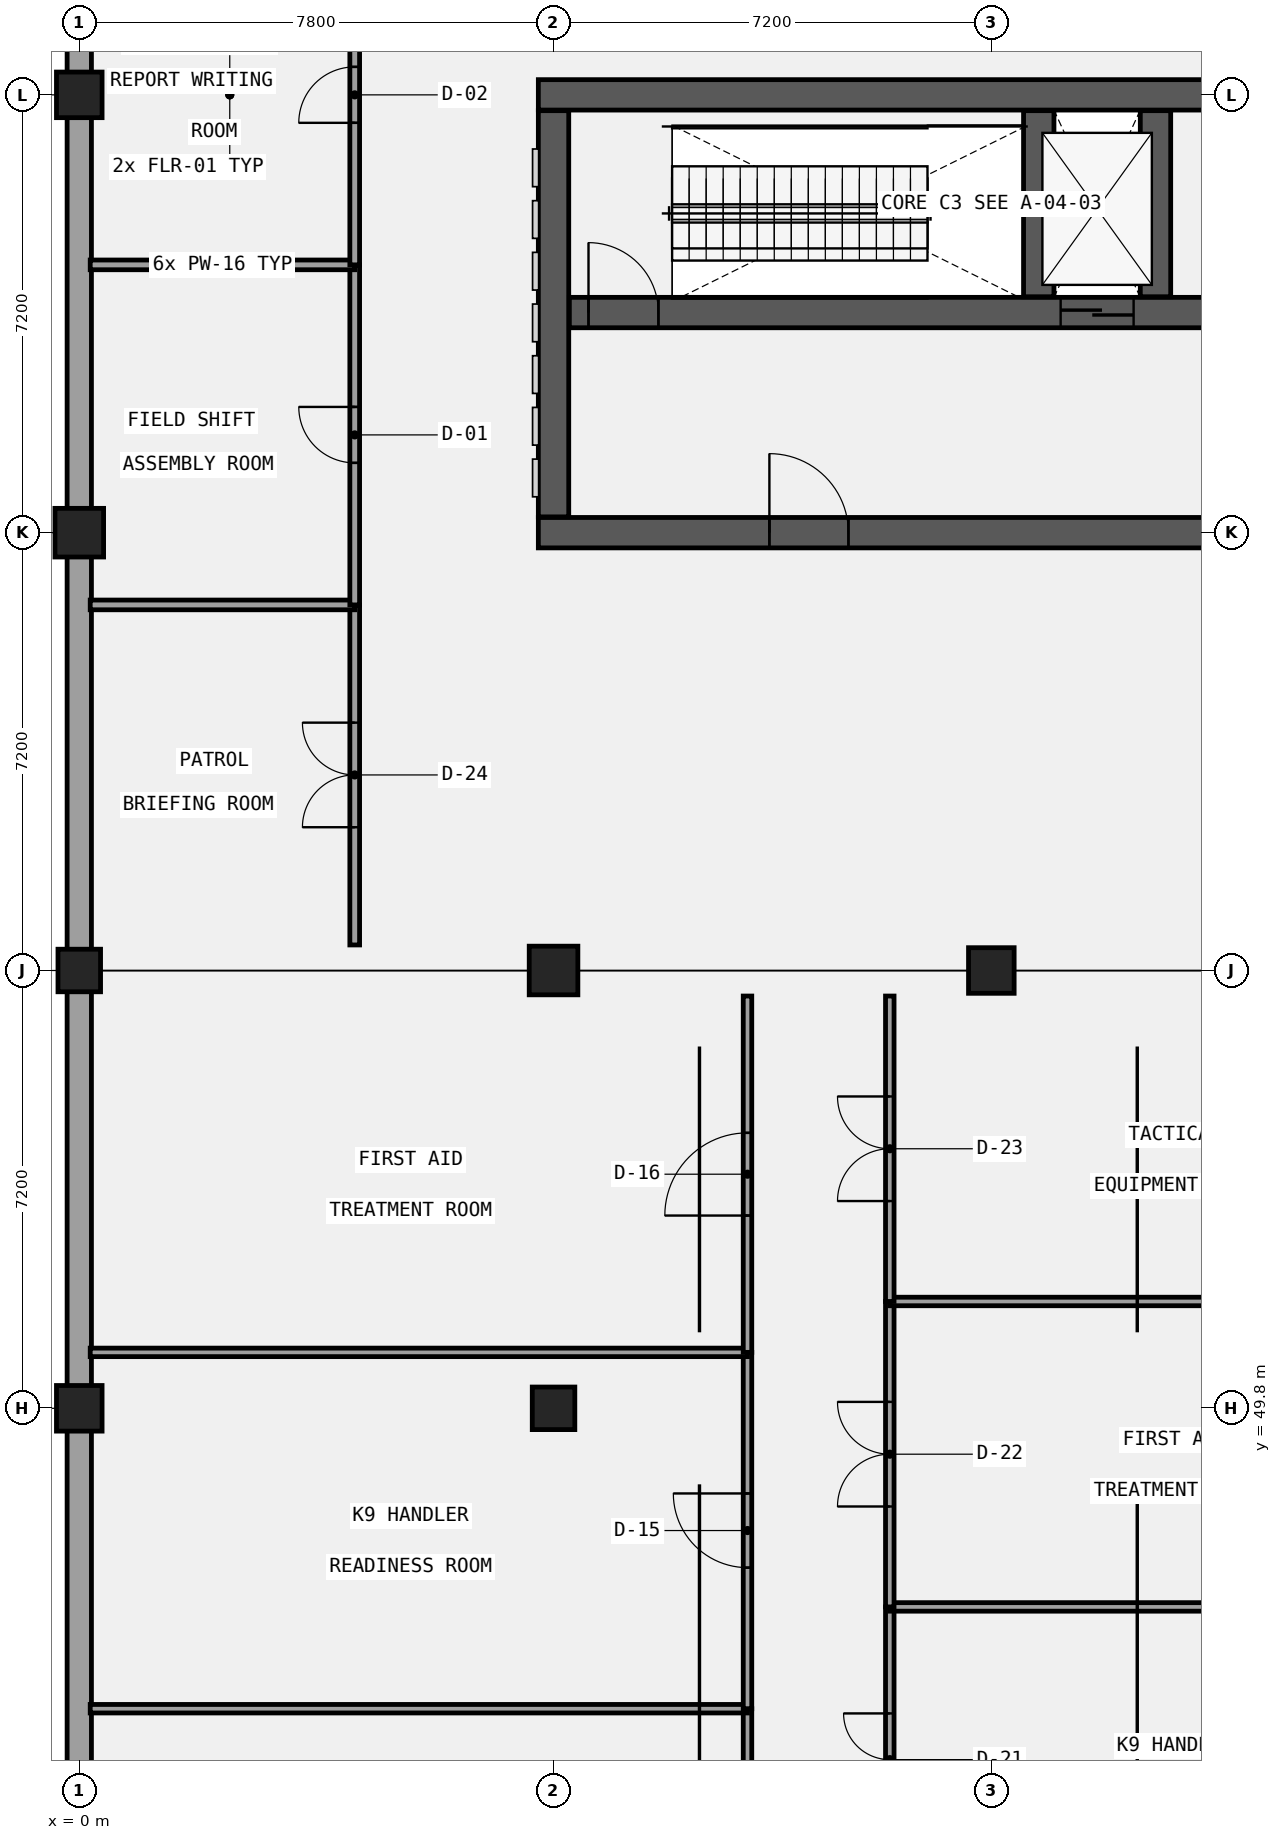
"""IFC4 building model, lengths in metres.
Left out: names, types, materials, properties, quantities, classifications, styles, units other than length and angle.
Written with IfcOpenShell. Run it as: python <this file> out.ifc"""

import sys

from ifc_helpers import new_model, si_unit, direction, frame, frame_2d, origin, origin_2d, place, context, subcontext, project, spatial, rectangle, extrude, element, fill, save


model = new_model("IFC4")
c1 = context("Model", 3, precision=1e-05, world=origin(), true_north=direction((0.0, 1.0)))
c2 = subcontext(c1, "Body", "Model", "MODEL_VIEW")
j1 = project(units=[si_unit("LENGTHUNIT", "METRE"), si_unit("PLANEANGLEUNIT", "RADIAN")], contexts=[c1])
p1 = place(None, origin())
s1 = spatial("IfcSite", under=j1, at=p1, CompositionType="ELEMENT")
p2 = place(p1, origin())
s2 = spatial("IfcBuilding", under=s1, at=p2, CompositionType="ELEMENT")
p3 = place(p2, origin())
s3 = spatial("IfcBuildingStorey", under=s2, at=p3, CompositionType="ELEMENT", Elevation=0.0)
p4 = place(p3, frame((7.55, 71.4, 0.0), z_axis=(0.0, 0.0, 1.0), x_axis=(1.0, 0.0, 0.0)))
e1 = element("IfcWall", 1, at=p4, inside=s3, PredefinedType="SHEAR", context=c2, shape_type="SweptSolid", body=[
    extrude(rectangle(XDim=14.9, YDim=0.5, at=frame_2d((7.45, 0.0))), origin(), (0.0, 0.0, 1.0), 5.4),
])
p5 = place(p3, frame((7.55, 64.2, 0.0), z_axis=(0.0, 0.0, 1.0), x_axis=(1.0, 0.0, 0.0)))
e2 = element("IfcWall", 2, at=p5, inside=s3, PredefinedType="SHEAR", context=c2, shape_type="SweptSolid", body=[
    extrude(rectangle(XDim=14.9, YDim=0.5, at=frame_2d((7.45, 0.0))), origin(), (0.0, 0.0, 1.0), 5.4),
])
p6 = place(p5, frame((3.8, 0.0, 0.0)))
e3 = element("IfcOpeningElement", 3, at=p6, cuts=e2, PredefinedType="OPENING", context=c2, shape_type="SweptSolid", body=[
    extrude(rectangle(XDim=1.3, YDim=2.2, at=frame_2d((0.65, 1.1))), frame((0.0, 0.26, 0.0), z_axis=(0.0, -1.0, 0.0), x_axis=(1.0, 0.0, 0.0)), (0.0, 0.0, 1.0), 0.52),
])
p7 = place(p3, frame((7.8, 64.46, 0.0), z_axis=(0.0, 0.0, 1.0), x_axis=(0.0, 1.0, 0.0)))
e4 = element("IfcWall", 4, at=p7, inside=s3, PredefinedType="SHEAR", context=c2, shape_type="SweptSolid", body=[
    extrude(rectangle(XDim=6.68, YDim=0.5, at=frame_2d((3.34, 0.0))), origin(), (0.0, 0.0, 1.0), 5.4),
])
p8 = place(p3, frame((8.06, 67.82, 0.0), z_axis=(0.0, 0.0, 1.0), x_axis=(1.0, 0.0, 0.0)))
e5 = element("IfcWall", 5, at=p8, inside=s3, PredefinedType="SHEAR", context=c2, shape_type="SweptSolid", body=[
    extrude(rectangle(XDim=13.88, YDim=0.5, at=frame_2d((6.94, 0.0))), origin(), (0.0, 0.0, 1.0), 5.4),
])
p9 = place(p8, frame((8.08, 0.0, 0.0)))
e6 = element("IfcOpeningElement", 6, at=p9, cuts=e5, PredefinedType="OPENING", context=c2, shape_type="SweptSolid", body=[
    extrude(rectangle(XDim=1.2, YDim=2.15, at=frame_2d((0.6, 1.075))), frame((0.0, 0.26, 0.0), z_axis=(0.0, -1.0, 0.0), x_axis=(1.0, 0.0, 0.0)), (0.0, 0.0, 1.0), 0.52),
])
p10 = place(p8, frame((0.315, 0.0, 0.0)))
e7 = element("IfcOpeningElement", 7, at=p10, cuts=e5, PredefinedType="OPENING", context=c2, shape_type="SweptSolid", body=[
    extrude(rectangle(XDim=1.15, YDim=2.15, at=frame_2d((0.575, 1.075))), frame((0.0, 0.26, 0.0), z_axis=(0.0, -1.0, 0.0), x_axis=(1.0, 0.0, 0.0)), (0.0, 0.0, 1.0), 0.52),
])
for number, where, z_axis, x_axis in (
    (8, (15.78, 68.08, 0.0), (0.0, 0.0, 1.0), (0.0, 1.0, 0.0)),
    (9, (17.7, 68.08, 0.0), (0.0, 0.0, 1.0), (0.0, 1.0, 0.0)),
):
    element("IfcWall", number, at=place(p3, frame(where, z_axis=z_axis, x_axis=x_axis)), inside=s3, PredefinedType="SHEAR", context=c2, shape_type="SweptSolid", body=[
        extrude(rectangle(XDim=3.06, YDim=0.5, at=frame_2d((1.53, 0.0))), origin(), (0.0, 0.0, 1.0), 5.4),
    ])
p11 = place(p3, frame((0.0, 49.8, -0.32), z_axis=(0.0, 0.0, 1.0), x_axis=(1.0, 0.0, 0.0)))
e10 = element("IfcColumn", 10, at=p11, inside=s3, PredefinedType="COLUMN", context=c2, shape_type="SweptSolid", body=[
    extrude(rectangle(XDim=0.75, YDim=0.75, at=origin_2d()), origin(), (0.0, 0.0, 1.0), 5.72),
])
p12 = place(p3, frame((0.0, 57.0, -0.32), z_axis=(0.0, 0.0, 1.0), x_axis=(1.0, 0.0, 0.0)))
e11 = element("IfcColumn", 11, at=p12, inside=s3, PredefinedType="COLUMN", context=c2, shape_type="SweptSolid", body=[
    extrude(rectangle(XDim=0.7, YDim=0.7, at=origin_2d()), origin(), (0.0, 0.0, 1.0), 5.72),
])
p13 = place(p3, frame((0.0, 64.2, -0.32), z_axis=(0.0, 0.0, 1.0), x_axis=(1.0, 0.0, 0.0)))
e12 = element("IfcColumn", 12, at=p13, inside=s3, PredefinedType="COLUMN", context=c2, shape_type="SweptSolid", body=[
    extrude(rectangle(XDim=0.8, YDim=0.8, at=origin_2d()), origin(), (0.0, 0.0, 1.0), 5.72),
])
p14 = place(p3, frame((0.0, 71.4, -0.32), z_axis=(0.0, 0.0, 1.0), x_axis=(1.0, 0.0, 0.0)))
e13 = element("IfcColumn", 13, at=p14, inside=s3, PredefinedType="COLUMN", context=c2, shape_type="SweptSolid", body=[
    extrude(rectangle(XDim=0.75, YDim=0.75, at=origin_2d()), origin(), (0.0, 0.0, 1.0), 5.72),
])
p15 = place(p3, frame((7.8, 49.8, 0.0), z_axis=(0.0, 0.0, 1.0), x_axis=(1.0, 0.0, 0.0)))
e14 = element("IfcColumn", 14, at=p15, inside=s3, PredefinedType="COLUMN", context=c2, shape_type="SweptSolid", body=[
    extrude(rectangle(XDim=0.7, YDim=0.7, at=origin_2d()), origin(), (0.0, 0.0, 1.0), 5.4),
])
p16 = place(p3, frame((7.8, 57.0, 0.0), z_axis=(0.0, 0.0, 1.0), x_axis=(1.0, 0.0, 0.0)))
e15 = element("IfcColumn", 15, at=p16, inside=s3, PredefinedType="COLUMN", context=c2, shape_type="SweptSolid", body=[
    extrude(rectangle(XDim=0.8, YDim=0.8, at=origin_2d()), origin(), (0.0, 0.0, 1.0), 5.4),
])
p17 = place(p3, frame((15.0, 57.0, 0.0), z_axis=(0.0, 0.0, 1.0), x_axis=(1.0, 0.0, 0.0)))
e16 = element("IfcColumn", 16, at=p17, inside=s3, PredefinedType="COLUMN", context=c2, shape_type="SweptSolid", body=[
    extrude(rectangle(XDim=0.75, YDim=0.75, at=origin_2d()), origin(), (0.0, 0.0, 1.0), 5.4),
])
p18 = place(p3, frame((0.0, 85.6, 0.0), z_axis=(0.0, 0.0, 1.0), x_axis=(0.0, -1.0, 0.0)))
e17 = element("IfcWall", 17, at=p18, inside=s3, PredefinedType="SOLIDWALL", context=c2, shape_type="SweptSolid", body=[
    extrude(rectangle(XDim=28.4, YDim=0.4, at=frame_2d((14.2, 0.0))), origin(), (0.0, 0.0, 1.0), 4.37),
])
p19 = place(p3, frame((0.0, 56.8, 0.0), z_axis=(0.0, 0.0, 1.0), x_axis=(0.0, -1.0, 0.0)))
e18 = element("IfcWall", 18, at=p19, inside=s3, PredefinedType="SOLIDWALL", context=c2, shape_type="SweptSolid", body=[
    extrude(rectangle(XDim=35.6, YDim=0.4, at=frame_2d((17.8, 0.0))), origin(), (0.0, 0.0, 1.0), 4.37),
])
p20 = place(p3, frame((10.99, 39.0, 0.0), z_axis=(0.0, 0.0, 1.0), x_axis=(0.0, 1.0, 0.0)))
e19 = element("IfcWall", 19, at=p20, inside=s3, PredefinedType="PARTITIONING", context=c2, shape_type="SweptSolid", body=[
    extrude(rectangle(XDim=5.86, YDim=0.14, at=frame_2d((2.93, 0.0))), origin(), (0.0, 0.0, 1.0), 5.12),
])
p21 = place(p20, frame((2.32, 0.0, 0.0)))
e20 = element("IfcOpeningElement", 20, at=p21, cuts=e19, PredefinedType="OPENING", context=c2, shape_type="SweptSolid", body=[
    extrude(rectangle(XDim=1.22, YDim=2.22, at=frame_2d((0.61, 1.11))), frame((0.0, 0.08, 0.0), z_axis=(0.0, -1.0, 0.0), x_axis=(1.0, 0.0, 0.0)), (0.0, 0.0, 1.0), 0.16),
])
p22 = place(p3, frame((0.18, 44.86, 0.0), z_axis=(0.0, 0.0, 1.0), x_axis=(1.0, 0.0, 0.0)))
e21 = element("IfcWall", 21, at=p22, inside=s3, PredefinedType="PARTITIONING", context=c2, shape_type="SweptSolid", body=[
    extrude(rectangle(XDim=10.81, YDim=0.14, at=frame_2d((5.405, 0.0))), origin(), (0.0, 0.0, 1.0), 5.12),
])
p23 = place(p3, frame((10.99, 44.86, 0.0), z_axis=(0.0, 0.0, 1.0), x_axis=(0.0, 1.0, 0.0)))
e22 = element("IfcWall", 22, at=p23, inside=s3, PredefinedType="PARTITIONING", context=c2, shape_type="SweptSolid", body=[
    extrude(rectangle(XDim=5.86, YDim=0.14, at=frame_2d((2.93, 0.0))), origin(), (0.0, 0.0, 1.0), 5.12),
])
p24 = place(p23, frame((2.32, 0.0, 0.0)))
e23 = element("IfcOpeningElement", 23, at=p24, cuts=e22, PredefinedType="OPENING", context=c2, shape_type="SweptSolid", body=[
    extrude(rectangle(XDim=1.22, YDim=2.35, at=frame_2d((0.61, 1.175))), frame((0.0, 0.08, 0.0), z_axis=(0.0, -1.0, 0.0), x_axis=(1.0, 0.0, 0.0)), (0.0, 0.0, 1.0), 0.16),
])
p25 = place(p3, frame((0.18, 50.72, 0.0), z_axis=(0.0, 0.0, 1.0), x_axis=(1.0, 0.0, 0.0)))
e24 = element("IfcWall", 24, at=p25, inside=s3, PredefinedType="PARTITIONING", context=c2, shape_type="SweptSolid", body=[
    extrude(rectangle(XDim=10.81, YDim=0.14, at=frame_2d((5.405, 0.0))), origin(), (0.0, 0.0, 1.0), 5.12),
])
p26 = place(p3, frame((10.99, 50.72, 0.0), z_axis=(0.0, 0.0, 1.0), x_axis=(0.0, 1.0, 0.0)))
e25 = element("IfcWall", 25, at=p26, inside=s3, PredefinedType="PARTITIONING", context=c2, shape_type="SweptSolid", body=[
    extrude(rectangle(XDim=5.86, YDim=0.14, at=frame_2d((2.93, 0.0))), origin(), (0.0, 0.0, 1.0), 5.12),
])
p27 = place(p26, frame((2.25, 0.0, 0.0)))
e26 = element("IfcOpeningElement", 26, at=p27, cuts=e25, PredefinedType="OPENING", context=c2, shape_type="SweptSolid", body=[
    extrude(rectangle(XDim=1.36, YDim=2.1, at=frame_2d((0.68, 1.05))), frame((0.0, 0.08, 0.0), z_axis=(0.0, -1.0, 0.0), x_axis=(1.0, 0.0, 0.0)), (0.0, 0.0, 1.0), 0.16),
])
p28 = place(p3, frame((13.33, 41.511, 0.0), z_axis=(0.0, 0.0, 1.0), x_axis=(0.0, 1.0, 0.0)))
e27 = element("IfcWall", 27, at=p28, inside=s3, PredefinedType="PARTITIONING", context=c2, shape_type="SweptSolid", body=[
    extrude(rectangle(XDim=5.023, YDim=0.14, at=frame_2d((2.511, 0.0))), origin(), (0.0, 0.0, 1.0), 5.12),
])
p29 = place(p28, frame((1.751, 0.0, 0.0)))
e28 = element("IfcOpeningElement", 28, at=p29, cuts=e27, PredefinedType="OPENING", context=c2, shape_type="SweptSolid", body=[
    extrude(rectangle(XDim=1.52, YDim=2.35, at=frame_2d((0.76, 1.175))), frame((0.0, 0.08, 0.0), z_axis=(0.0, -1.0, 0.0), x_axis=(1.0, 0.0, 0.0)), (0.0, 0.0, 1.0), 0.16),
])
p30 = place(p3, frame((13.33, 46.534, 0.0), z_axis=(0.0, 0.0, 1.0), x_axis=(1.0, 0.0, 0.0)))
e29 = element("IfcWall", 29, at=p30, inside=s3, PredefinedType="PARTITIONING", context=c2, shape_type="SweptSolid", body=[
    extrude(rectangle(XDim=8.87, YDim=0.14, at=frame_2d((4.435, 0.0))), origin(), (0.0, 0.0, 1.0), 5.12),
])
p31 = place(p3, frame((13.33, 46.534, 0.0), z_axis=(0.0, 0.0, 1.0), x_axis=(0.0, 1.0, 0.0)))
e30 = element("IfcWall", 30, at=p31, inside=s3, PredefinedType="PARTITIONING", context=c2, shape_type="SweptSolid", body=[
    extrude(rectangle(XDim=5.023, YDim=0.14, at=frame_2d((2.511, 0.0))), origin(), (0.0, 0.0, 1.0), 5.12),
])
p32 = place(p31, frame((1.652, 0.0, 0.0)))
e31 = element("IfcOpeningElement", 31, at=p32, cuts=e30, PredefinedType="OPENING", context=c2, shape_type="SweptSolid", body=[
    extrude(rectangle(XDim=1.72, YDim=2.1, at=frame_2d((0.86, 1.05))), frame((0.0, 0.08, 0.0), z_axis=(0.0, -1.0, 0.0), x_axis=(1.0, 0.0, 0.0)), (0.0, 0.0, 1.0), 0.16),
])
p33 = place(p3, frame((13.33, 51.557, 0.0), z_axis=(0.0, 0.0, 1.0), x_axis=(1.0, 0.0, 0.0)))
e32 = element("IfcWall", 32, at=p33, inside=s3, PredefinedType="PARTITIONING", context=c2, shape_type="SweptSolid", body=[
    extrude(rectangle(XDim=8.87, YDim=0.14, at=frame_2d((4.435, 0.0))), origin(), (0.0, 0.0, 1.0), 5.12),
])
p34 = place(p3, frame((13.33, 51.557, 0.0), z_axis=(0.0, 0.0, 1.0), x_axis=(0.0, 1.0, 0.0)))
e33 = element("IfcWall", 33, at=p34, inside=s3, PredefinedType="PARTITIONING", context=c2, shape_type="SweptSolid", body=[
    extrude(rectangle(XDim=5.023, YDim=0.14, at=frame_2d((2.512, 0.0))), origin(), (0.0, 0.0, 1.0), 5.12),
])
p35 = place(p34, frame((1.652, 0.0, 0.0)))
e34 = element("IfcOpeningElement", 34, at=p35, cuts=e33, PredefinedType="OPENING", context=c2, shape_type="SweptSolid", body=[
    extrude(rectangle(XDim=1.72, YDim=2.22, at=frame_2d((0.86, 1.11))), frame((0.0, 0.08, 0.0), z_axis=(0.0, -1.0, 0.0), x_axis=(1.0, 0.0, 0.0)), (0.0, 0.0, 1.0), 0.16),
])
p36 = place(p3, frame((4.53, 57.42, 0.0), z_axis=(0.0, 0.0, 1.0), x_axis=(0.0, 1.0, 0.0)))
e35 = element("IfcWall", 35, at=p36, inside=s3, PredefinedType="PARTITIONING", context=c2, shape_type="SweptSolid", body=[
    extrude(rectangle(XDim=5.592, YDim=0.16, at=frame_2d((2.796, 0.0))), origin(), (0.0, 0.0, 1.0), 5.12),
])
p37 = place(p36, frame((1.936, 0.0, 0.0)))
e36 = element("IfcOpeningElement", 36, at=p37, cuts=e35, PredefinedType="OPENING", context=c2, shape_type="SweptSolid", body=[
    extrude(rectangle(XDim=1.72, YDim=2.35, at=frame_2d((0.86, 1.175))), frame((0.0, 0.09, 0.0), z_axis=(0.0, -1.0, 0.0), x_axis=(1.0, 0.0, 0.0)), (0.0, 0.0, 1.0), 0.18),
])
p38 = place(p3, frame((0.18, 63.012, 0.0), z_axis=(0.0, 0.0, 1.0), x_axis=(1.0, 0.0, 0.0)))
e37 = element("IfcWall", 37, at=p38, inside=s3, PredefinedType="PARTITIONING", context=c2, shape_type="SweptSolid", body=[
    extrude(rectangle(XDim=4.35, YDim=0.16, at=frame_2d((2.175, 0.0))), origin(), (0.0, 0.0, 1.0), 5.12),
])
p39 = place(p3, frame((4.53, 63.012, 0.0), z_axis=(0.0, 0.0, 1.0), x_axis=(0.0, 1.0, 0.0)))
e38 = element("IfcWall", 38, at=p39, inside=s3, PredefinedType="PARTITIONING", context=c2, shape_type="SweptSolid", body=[
    extrude(rectangle(XDim=5.592, YDim=0.16, at=frame_2d((2.796, 0.0))), origin(), (0.0, 0.0, 1.0), 5.12),
])
p40 = place(p39, frame((2.336, 0.0, 0.0)))
e39 = element("IfcOpeningElement", 39, at=p40, cuts=e38, PredefinedType="OPENING", context=c2, shape_type="SweptSolid", body=[
    extrude(rectangle(XDim=0.92, YDim=2.1, at=frame_2d((0.46, 1.05))), frame((0.0, 0.09, 0.0), z_axis=(0.0, -1.0, 0.0), x_axis=(1.0, 0.0, 0.0)), (0.0, 0.0, 1.0), 0.18),
])
p41 = place(p3, frame((0.18, 68.604, 0.0), z_axis=(0.0, 0.0, 1.0), x_axis=(1.0, 0.0, 0.0)))
e40 = element("IfcWall", 40, at=p41, inside=s3, PredefinedType="PARTITIONING", context=c2, shape_type="SweptSolid", body=[
    extrude(rectangle(XDim=4.35, YDim=0.16, at=frame_2d((2.175, 0.0))), origin(), (0.0, 0.0, 1.0), 5.12),
])
p42 = place(p3, frame((4.53, 68.604, 0.0), z_axis=(0.0, 0.0, 1.0), x_axis=(0.0, 1.0, 0.0)))
e41 = element("IfcWall", 41, at=p42, inside=s3, PredefinedType="PARTITIONING", context=c2, shape_type="SweptSolid", body=[
    extrude(rectangle(XDim=5.592, YDim=0.16, at=frame_2d((2.796, 0.0))), origin(), (0.0, 0.0, 1.0), 5.12),
])
p43 = place(p42, frame((2.336, 0.0, 0.0)))
e42 = element("IfcOpeningElement", 42, at=p43, cuts=e41, PredefinedType="OPENING", context=c2, shape_type="SweptSolid", body=[
    extrude(rectangle(XDim=0.92, YDim=2.22, at=frame_2d((0.46, 1.11))), frame((0.0, 0.09, 0.0), z_axis=(0.0, -1.0, 0.0), x_axis=(1.0, 0.0, 0.0)), (0.0, 0.0, 1.0), 0.18),
])
p44 = place(p9, frame((1.2, 0.0, 0.0), z_axis=(0.0, 0.0, 1.0), x_axis=(-1.0, 0.0, 0.0)))
e43 = element("IfcDoor", 43, at=p44, inside=s3, OperationType="DOUBLE_DOOR_SLIDING", PredefinedType="DOOR", context=c2, shape_type="SweptSolid", body=[
    extrude(rectangle(XDim=1.2, YDim=2.15, at=frame_2d((0.6, 1.075))), frame((0.0, 0.025, 0.0), z_axis=(0.0, -1.0, 0.0), x_axis=(1.0, 0.0, 0.0)), (0.0, 0.0, 1.0), 0.05),
])
fill(e6, e43)
p45 = place(p10, origin())
e44 = element("IfcDoor", 44, at=p45, inside=s3, OperationType="SINGLE_SWING_LEFT", PredefinedType="DOOR", context=c2, shape_type="SweptSolid", body=[
    extrude(rectangle(XDim=1.15, YDim=2.15, at=frame_2d((0.575, 1.075))), frame((0.0, 0.025, 0.0), z_axis=(0.0, -1.0, 0.0), x_axis=(1.0, 0.0, 0.0)), (0.0, 0.0, 1.0), 0.05),
])
fill(e7, e44)
p46 = place(p6, frame((1.3, 0.0, 0.0), z_axis=(0.0, 0.0, 1.0), x_axis=(-1.0, 0.0, 0.0)))
e45 = element("IfcDoor", 45, at=p46, inside=s3, OperationType="SINGLE_SWING_LEFT", PredefinedType="DOOR", context=c2, shape_type="SweptSolid", body=[
    extrude(rectangle(XDim=1.3, YDim=2.2, at=frame_2d((0.65, 1.1))), frame((0.0, 0.025, 0.0), z_axis=(0.0, -1.0, 0.0), x_axis=(1.0, 0.0, 0.0)), (0.0, 0.0, 1.0), 0.05),
])
fill(e3, e45)
p47 = place(p24, frame((1.22, 0.0, 0.0), z_axis=(0.0, 0.0, 1.0), x_axis=(-1.0, 0.0, 0.0)))
e46 = element("IfcDoor", 46, at=p47, inside=s3, OperationType="SINGLE_SWING_RIGHT", PredefinedType="DOOR", context=c2, shape_type="SweptSolid", body=[
    extrude(rectangle(XDim=1.22, YDim=2.35, at=frame_2d((0.61, 1.175))), frame((0.0, 0.025, 0.0), z_axis=(0.0, -1.0, 0.0), x_axis=(1.0, 0.0, 0.0)), (0.0, 0.0, 1.0), 0.05),
])
fill(e23, e46)
p48 = place(p27, frame((1.36, 0.0, 0.0), z_axis=(0.0, 0.0, 1.0), x_axis=(-1.0, 0.0, 0.0)))
e47 = element("IfcDoor", 47, at=p48, inside=s3, OperationType="SINGLE_SWING_LEFT", PredefinedType="DOOR", context=c2, shape_type="SweptSolid", body=[
    extrude(rectangle(XDim=1.36, YDim=2.1, at=frame_2d((0.68, 1.05))), frame((0.0, 0.025, 0.0), z_axis=(0.0, -1.0, 0.0), x_axis=(1.0, 0.0, 0.0)), (0.0, 0.0, 1.0), 0.05),
])
fill(e26, e47)
p49 = place(p29, origin())
e48 = element("IfcDoor", 48, at=p49, inside=s3, OperationType="DOUBLE_DOOR_SINGLE_SWING", PredefinedType="DOOR", context=c2, shape_type="SweptSolid", body=[
    extrude(rectangle(XDim=1.52, YDim=2.35, at=frame_2d((0.76, 1.175))), frame((0.0, 0.025, 0.0), z_axis=(0.0, -1.0, 0.0), x_axis=(1.0, 0.0, 0.0)), (0.0, 0.0, 1.0), 0.05),
])
fill(e28, e48)
p50 = place(p32, origin())
e49 = element("IfcDoor", 49, at=p50, inside=s3, OperationType="DOUBLE_DOOR_SINGLE_SWING", PredefinedType="DOOR", context=c2, shape_type="SweptSolid", body=[
    extrude(rectangle(XDim=1.72, YDim=2.1, at=frame_2d((0.86, 1.05))), frame((0.0, 0.025, 0.0), z_axis=(0.0, -1.0, 0.0), x_axis=(1.0, 0.0, 0.0)), (0.0, 0.0, 1.0), 0.05),
])
fill(e31, e49)
p51 = place(p35, origin())
e50 = element("IfcDoor", 50, at=p51, inside=s3, OperationType="DOUBLE_DOOR_SINGLE_SWING", PredefinedType="DOOR", context=c2, shape_type="SweptSolid", body=[
    extrude(rectangle(XDim=1.72, YDim=2.22, at=frame_2d((0.86, 1.11))), frame((0.0, 0.025, 0.0), z_axis=(0.0, -1.0, 0.0), x_axis=(1.0, 0.0, 0.0)), (0.0, 0.0, 1.0), 0.05),
])
fill(e34, e50)
p52 = place(p37, frame((1.72, 0.0, 0.0), z_axis=(0.0, 0.0, 1.0), x_axis=(-1.0, 0.0, 0.0)))
e51 = element("IfcDoor", 51, at=p52, inside=s3, OperationType="DOUBLE_DOOR_SINGLE_SWING", PredefinedType="DOOR", context=c2, shape_type="SweptSolid", body=[
    extrude(rectangle(XDim=1.72, YDim=2.35, at=frame_2d((0.86, 1.175))), frame((0.0, 0.025, 0.0), z_axis=(0.0, -1.0, 0.0), x_axis=(1.0, 0.0, 0.0)), (0.0, 0.0, 1.0), 0.05),
])
fill(e36, e51)
p53 = place(p40, frame((0.92, 0.0, 0.0), z_axis=(0.0, 0.0, 1.0), x_axis=(-1.0, 0.0, 0.0)))
e52 = element("IfcDoor", 52, at=p53, inside=s3, OperationType="SINGLE_SWING_RIGHT", PredefinedType="DOOR", context=c2, shape_type="SweptSolid", body=[
    extrude(rectangle(XDim=0.92, YDim=2.1, at=frame_2d((0.46, 1.05))), frame((0.0, 0.025, 0.0), z_axis=(0.0, -1.0, 0.0), x_axis=(1.0, 0.0, 0.0)), (0.0, 0.0, 1.0), 0.05),
])
fill(e39, e52)
p54 = place(p43, frame((0.92, 0.0, 0.0), z_axis=(0.0, 0.0, 1.0), x_axis=(-1.0, 0.0, 0.0)))
e53 = element("IfcDoor", 53, at=p54, inside=s3, OperationType="SINGLE_SWING_LEFT", PredefinedType="DOOR", context=c2, shape_type="SweptSolid", body=[
    extrude(rectangle(XDim=0.92, YDim=2.22, at=frame_2d((0.46, 1.11))), frame((0.0, 0.025, 0.0), z_axis=(0.0, -1.0, 0.0), x_axis=(1.0, 0.0, 0.0)), (0.0, 0.0, 1.0), 0.05),
])
fill(e42, e53)
save(model, sys.argv[1])
